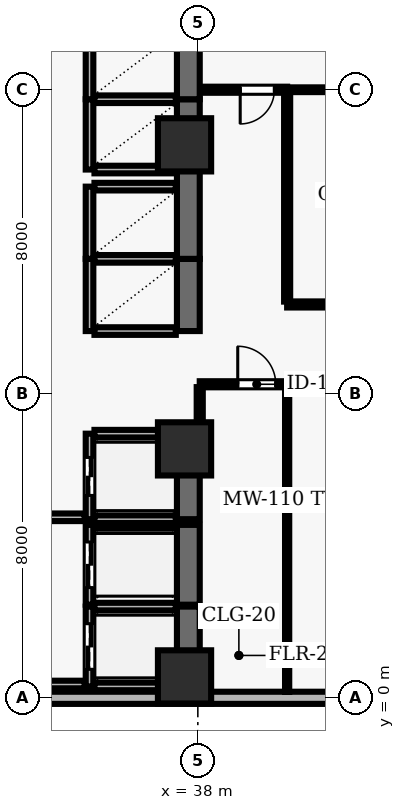
"""IFC4 building model, lengths in metres.
Left out: names, types, materials, properties, quantities, classifications, styles, units other than length and angle.
Written with IfcOpenShell. Run it as: python <this file> out.ifc"""

import sys

from ifc_helpers import new_model, si_unit, direction, frame, frame_2d, origin, origin_2d, place, context, subcontext, project, spatial, rectangle, extrude, element, fill, save


model = new_model("IFC4")
c1 = context("Model", 3, precision=1e-05, world=origin(), true_north=direction((0.0, 1.0)))
c2 = subcontext(c1, "Body", "Model", "MODEL_VIEW")
j1 = project(units=[si_unit("LENGTHUNIT", "METRE"), si_unit("PLANEANGLEUNIT", "RADIAN")], contexts=[c1])
p1 = place(None, origin())
s1 = spatial("IfcSite", under=j1, at=p1, CompositionType="ELEMENT")
p2 = place(p1, origin())
s2 = spatial("IfcBuilding", under=s1, at=p2, CompositionType="ELEMENT")
p3 = place(p2, frame((0.0, 0.0, 89.5)))
s3 = spatial("IfcBuildingStorey", under=s2, at=p3, CompositionType="ELEMENT", Elevation=89.5)
for number, where, z_axis, x_axis in (
    (1, (37.65, 0.55, 0.0), (0.0, 0.0, 1.0), (1.0, 0.0, 0.0)),
    (2, (37.65, 6.55, 0.0), (0.0, 0.0, 1.0), (1.0, 0.0, 0.0)),
    (3, (37.65, 14.55, 0.0), (0.0, 0.0, 1.0), (1.0, 0.0, 0.0)),
):
    element("IfcColumn", number, at=place(p3, frame(where, z_axis=z_axis, x_axis=x_axis)), inside=s3, PredefinedType="COLUMN", context=c2, shape_type="SweptSolid", body=[
        extrude(rectangle(XDim=1.4, YDim=1.4, at=origin_2d()), origin(), (0.0, 0.0, 1.0), 3.9),
    ])
p4 = place(p3, frame((24.5, 0.0, 0.0), z_axis=(0.0, 0.0, 1.0), x_axis=(1.0, 0.0, 0.0)))
e4 = element("IfcWall", 4, at=p4, inside=s3, PredefinedType="SOLIDWALL", context=c2, shape_type="SweptSolid", body=[
    extrude(rectangle(XDim=49.0, YDim=0.32, at=frame_2d((24.5, 0.0))), origin(), (0.0, 0.0, 1.0), 3.64),
])
p5 = place(p4, frame((1.822, 0.0, 0.9)))
e5 = element("IfcOpeningElement", 5, at=p5, cuts=e4, PredefinedType="OPENING", context=c2, shape_type="SweptSolid", body=[
    extrude(rectangle(XDim=1.8, YDim=2.2, at=frame_2d((0.9, 1.1))), frame((0.0, 0.17, 0.0), z_axis=(0.0, -1.0, 0.0), x_axis=(1.0, 0.0, 0.0)), (0.0, 0.0, 1.0), 0.34),
])
p6 = place(p4, frame((18.156, 0.0, 0.9)))
e6 = element("IfcOpeningElement", 6, at=p6, cuts=e4, PredefinedType="OPENING", context=c2, shape_type="SweptSolid", body=[
    extrude(rectangle(XDim=1.8, YDim=2.2, at=frame_2d((0.9, 1.1))), frame((0.0, 0.17, 0.0), z_axis=(0.0, -1.0, 0.0), x_axis=(1.0, 0.0, 0.0)), (0.0, 0.0, 1.0), 0.34),
])
p7 = place(p4, frame((22.7, 0.0, 0.9)))
e7 = element("IfcOpeningElement", 7, at=p7, cuts=e4, PredefinedType="OPENING", context=c2, shape_type="SweptSolid", body=[
    extrude(rectangle(XDim=1.8, YDim=2.2, at=frame_2d((0.9, 1.1))), frame((0.0, 0.17, 0.0), z_axis=(0.0, -1.0, 0.0), x_axis=(1.0, 0.0, 0.0)), (0.0, 0.0, 1.0), 0.34),
])
p8 = place(p4, frame((29.044, 0.0, 0.9)))
e8 = element("IfcOpeningElement", 8, at=p8, cuts=e4, PredefinedType="OPENING", context=c2, shape_type="SweptSolid", body=[
    extrude(rectangle(XDim=1.8, YDim=2.2, at=frame_2d((0.9, 1.1))), frame((0.0, 0.17, 0.0), z_axis=(0.0, -1.0, 0.0), x_axis=(1.0, 0.0, 0.0)), (0.0, 0.0, 1.0), 0.34),
])
p9 = place(p4, frame((35.389, 0.0, 0.9)))
e9 = element("IfcOpeningElement", 9, at=p9, cuts=e4, PredefinedType="OPENING", context=c2, shape_type="SweptSolid", body=[
    extrude(rectangle(XDim=1.8, YDim=2.2, at=frame_2d((0.9, 1.1))), frame((0.0, 0.17, 0.0), z_axis=(0.0, -1.0, 0.0), x_axis=(1.0, 0.0, 0.0)), (0.0, 0.0, 1.0), 0.34),
])
p10 = place(p4, frame((39.933, 0.0, 0.9)))
e10 = element("IfcOpeningElement", 10, at=p10, cuts=e4, PredefinedType="OPENING", context=c2, shape_type="SweptSolid", body=[
    extrude(rectangle(XDim=1.8, YDim=2.2, at=frame_2d((0.9, 1.1))), frame((0.0, 0.17, 0.0), z_axis=(0.0, -1.0, 0.0), x_axis=(1.0, 0.0, 0.0)), (0.0, 0.0, 1.0), 0.34),
])
p11 = place(p4, frame((45.378, 0.0, 0.9)))
e11 = element("IfcOpeningElement", 11, at=p11, cuts=e4, PredefinedType="OPENING", context=c2, shape_type="SweptSolid", body=[
    extrude(rectangle(XDim=1.8, YDim=2.2, at=frame_2d((0.9, 1.1))), frame((0.0, 0.17, 0.0), z_axis=(0.0, -1.0, 0.0), x_axis=(1.0, 0.0, 0.0)), (0.0, 0.0, 1.0), 0.34),
])
p12 = place(p3, frame((35.15, 2.4, 0.0), z_axis=(0.0, 0.0, 1.0), x_axis=(0.0, -1.0, 0.0)))
e12 = element("IfcWall", 12, at=p12, inside=s3, PredefinedType="SOLIDWALL", context=c2, shape_type="SweptSolid", body=[
    extrude(rectangle(XDim=2.1, YDim=0.2, at=frame_2d((1.05, 0.0))), origin(), (0.0, 0.0, 1.0), 3.64),
])
p13 = place(p12, frame((0.45, 0.0, 0.0)))
e13 = element("IfcOpeningElement", 13, at=p13, cuts=e12, PredefinedType="OPENING", context=c2, shape_type="SweptSolid", body=[
    extrude(rectangle(XDim=1.2, YDim=2.15, at=frame_2d((0.6, 1.075))), frame((0.0, 0.11, 0.0), z_axis=(0.0, -1.0, 0.0), x_axis=(1.0, 0.0, 0.0)), (0.0, 0.0, 1.0), 0.22),
])
p14 = place(p3, frame((37.75, 0.3, 0.0), z_axis=(0.0, 0.0, 1.0), x_axis=(0.0, 1.0, 0.0)))
e14 = element("IfcWall", 14, at=p14, inside=s3, PredefinedType="SHEAR", context=c2, shape_type="SweptSolid", body=[
    extrude(rectangle(XDim=2.1, YDim=0.6, at=frame_2d((1.05, 0.0))), origin(), (0.0, 0.0, 1.0), 3.64),
])
for number, where, z_axis, x_axis in (
    (15, (35.28, 0.3, 0.0), (0.0, 0.0, 1.0), (1.0, 0.0, 0.0)),
    (16, (37.42, 2.4, 0.0), (0.0, 0.0, 1.0), (-1.0, 0.0, 0.0)),
):
    element("IfcWall", number, at=place(p3, frame(where, z_axis=z_axis, x_axis=x_axis)), inside=s3, PredefinedType="SOLIDWALL", context=c2, shape_type="SweptSolid", body=[
        extrude(rectangle(XDim=2.14, YDim=0.2, at=frame_2d((1.07, 0.0))), origin(), (0.0, 0.0, 1.0), 3.64),
    ])
p15 = place(p3, frame((35.15, 4.55, 0.0), z_axis=(0.0, 0.0, 1.0), x_axis=(0.0, -1.0, 0.0)))
e17 = element("IfcWall", 17, at=p15, inside=s3, PredefinedType="SOLIDWALL", context=c2, shape_type="SweptSolid", body=[
    extrude(rectangle(XDim=2.1, YDim=0.2, at=frame_2d((1.05, 0.0))), origin(), (0.0, 0.0, 1.0), 3.64),
])
p16 = place(p15, frame((0.45, 0.0, 0.0)))
e18 = element("IfcOpeningElement", 18, at=p16, cuts=e17, PredefinedType="OPENING", context=c2, shape_type="SweptSolid", body=[
    extrude(rectangle(XDim=1.2, YDim=2.15, at=frame_2d((0.6, 1.075))), frame((0.0, 0.11, 0.0), z_axis=(0.0, -1.0, 0.0), x_axis=(1.0, 0.0, 0.0)), (0.0, 0.0, 1.0), 0.22),
])
p17 = place(p3, frame((37.75, 2.45, 0.0), z_axis=(0.0, 0.0, 1.0), x_axis=(0.0, 1.0, 0.0)))
e19 = element("IfcWall", 19, at=p17, inside=s3, PredefinedType="SHEAR", context=c2, shape_type="SweptSolid", body=[
    extrude(rectangle(XDim=2.1, YDim=0.6, at=frame_2d((1.05, 0.0))), origin(), (0.0, 0.0, 1.0), 3.64),
])
p18 = place(p3, frame((37.42, 4.55, 0.0), z_axis=(0.0, 0.0, 1.0), x_axis=(-1.0, 0.0, 0.0)))
e20 = element("IfcWall", 20, at=p18, inside=s3, PredefinedType="SOLIDWALL", context=c2, shape_type="SweptSolid", body=[
    extrude(rectangle(XDim=2.14, YDim=0.2, at=frame_2d((1.07, 0.0))), origin(), (0.0, 0.0, 1.0), 3.64),
])
p19 = place(p3, frame((35.15, 6.95, 0.0), z_axis=(0.0, 0.0, 1.0), x_axis=(0.0, -1.0, 0.0)))
e21 = element("IfcWall", 21, at=p19, inside=s3, PredefinedType="SOLIDWALL", context=c2, shape_type="SweptSolid", body=[
    extrude(rectangle(XDim=2.25, YDim=0.2, at=frame_2d((1.125, 0.0))), origin(), (0.0, 0.0, 1.0), 3.64),
])
p20 = place(p19, frame((0.625, 0.0, 0.0)))
e22 = element("IfcOpeningElement", 22, at=p20, cuts=e21, PredefinedType="OPENING", context=c2, shape_type="SweptSolid", body=[
    extrude(rectangle(XDim=1.0, YDim=2.1, at=frame_2d((0.5, 1.05))), frame((0.0, 0.11, 0.0), z_axis=(0.0, -1.0, 0.0), x_axis=(1.0, 0.0, 0.0)), (0.0, 0.0, 1.0), 0.22),
])
p21 = place(p3, frame((37.75, 4.7, 0.0), z_axis=(0.0, 0.0, 1.0), x_axis=(0.0, 1.0, 0.0)))
e23 = element("IfcWall", 23, at=p21, inside=s3, PredefinedType="SHEAR", context=c2, shape_type="SweptSolid", body=[
    extrude(rectangle(XDim=2.25, YDim=0.6, at=frame_2d((1.125, 0.0))), origin(), (0.0, 0.0, 1.0), 3.64),
])
for number, where, z_axis, x_axis in (
    (24, (35.28, 4.7, 0.0), (0.0, 0.0, 1.0), (1.0, 0.0, 0.0)),
    (25, (37.42, 6.95, 0.0), (0.0, 0.0, 1.0), (-1.0, 0.0, 0.0)),
):
    element("IfcWall", number, at=place(p3, frame(where, z_axis=z_axis, x_axis=x_axis)), inside=s3, PredefinedType="SOLIDWALL", context=c2, shape_type="SweptSolid", body=[
        extrude(rectangle(XDim=2.14, YDim=0.2, at=frame_2d((1.07, 0.0))), origin(), (0.0, 0.0, 1.0), 3.64),
    ])
p22 = place(p3, frame((35.15, 11.55, 0.0), z_axis=(0.0, 0.0, 1.0), x_axis=(0.0, -1.0, 0.0)))
e26 = element("IfcWall", 26, at=p22, inside=s3, PredefinedType="SOLIDWALL", context=c2, shape_type="SweptSolid", body=[
    extrude(rectangle(XDim=1.9, YDim=0.2, at=frame_2d((0.95, 0.0))), origin(), (0.0, 0.0, 1.0), 3.64),
])
p23 = place(p3, frame((37.75, 9.65, 0.0), z_axis=(0.0, 0.0, 1.0), x_axis=(0.0, 1.0, 0.0)))
e27 = element("IfcWall", 27, at=p23, inside=s3, PredefinedType="SHEAR", context=c2, shape_type="SweptSolid", body=[
    extrude(rectangle(XDim=1.9, YDim=0.6, at=frame_2d((0.95, 0.0))), origin(), (0.0, 0.0, 1.0), 3.64),
])
for number, where, z_axis, x_axis in (
    (28, (35.28, 9.65, 0.0), (0.0, 0.0, 1.0), (1.0, 0.0, 0.0)),
    (29, (37.42, 11.55, 0.0), (0.0, 0.0, 1.0), (-1.0, 0.0, 0.0)),
):
    element("IfcWall", number, at=place(p3, frame(where, z_axis=z_axis, x_axis=x_axis)), inside=s3, PredefinedType="SOLIDWALL", context=c2, shape_type="SweptSolid", body=[
        extrude(rectangle(XDim=2.14, YDim=0.2, at=frame_2d((1.07, 0.0))), origin(), (0.0, 0.0, 1.0), 3.64),
    ])
p24 = place(p3, frame((35.15, 13.45, 0.0), z_axis=(0.0, 0.0, 1.0), x_axis=(0.0, -1.0, 0.0)))
e30 = element("IfcWall", 30, at=p24, inside=s3, PredefinedType="SOLIDWALL", context=c2, shape_type="SweptSolid", body=[
    extrude(rectangle(XDim=1.9, YDim=0.2, at=frame_2d((0.95, 0.0))), origin(), (0.0, 0.0, 1.0), 3.64),
])
p25 = place(p3, frame((37.75, 11.55, 0.0), z_axis=(0.0, 0.0, 1.0), x_axis=(0.0, 1.0, 0.0)))
e31 = element("IfcWall", 31, at=p25, inside=s3, PredefinedType="SHEAR", context=c2, shape_type="SweptSolid", body=[
    extrude(rectangle(XDim=2.35, YDim=0.6, at=frame_2d((1.175, 0.0))), origin(), (0.0, 0.0, 1.0), 3.64),
])
p26 = place(p3, frame((37.42, 13.45, 0.0), z_axis=(0.0, 0.0, 1.0), x_axis=(-1.0, 0.0, 0.0)))
e32 = element("IfcWall", 32, at=p26, inside=s3, PredefinedType="SOLIDWALL", context=c2, shape_type="SweptSolid", body=[
    extrude(rectangle(XDim=2.14, YDim=0.2, at=frame_2d((1.07, 0.0))), origin(), (0.0, 0.0, 1.0), 3.64),
])
p27 = place(p3, frame((35.15, 15.75, 0.0), z_axis=(0.0, 0.0, 1.0), x_axis=(0.0, -1.0, 0.0)))
e33 = element("IfcWall", 33, at=p27, inside=s3, PredefinedType="SOLIDWALL", context=c2, shape_type="SweptSolid", body=[
    extrude(rectangle(XDim=1.85, YDim=0.2, at=frame_2d((0.925, 0.0))), origin(), (0.0, 0.0, 1.0), 3.64),
])
p28 = place(p3, frame((37.75, 13.9, 0.0), z_axis=(0.0, 0.0, 1.0), x_axis=(0.0, 1.0, 0.0)))
e34 = element("IfcWall", 34, at=p28, inside=s3, PredefinedType="SHEAR", context=c2, shape_type="SweptSolid", body=[
    extrude(rectangle(XDim=1.85, YDim=0.6, at=frame_2d((0.925, 0.0))), origin(), (0.0, 0.0, 1.0), 3.64),
])
for number, where, z_axis, x_axis in (
    (35, (35.28, 13.9, 0.0), (0.0, 0.0, 1.0), (1.0, 0.0, 0.0)),
    (36, (37.42, 15.75, 0.0), (0.0, 0.0, 1.0), (-1.0, 0.0, 0.0)),
):
    element("IfcWall", number, at=place(p3, frame(where, z_axis=z_axis, x_axis=x_axis)), inside=s3, PredefinedType="SOLIDWALL", context=c2, shape_type="SweptSolid", body=[
        extrude(rectangle(XDim=2.14, YDim=0.2, at=frame_2d((1.07, 0.0))), origin(), (0.0, 0.0, 1.0), 3.64),
    ])
p29 = place(p3, frame((35.15, 17.6, 0.0), z_axis=(0.0, 0.0, 1.0), x_axis=(0.0, -1.0, 0.0)))
e37 = element("IfcWall", 37, at=p29, inside=s3, PredefinedType="SOLIDWALL", context=c2, shape_type="SweptSolid", body=[
    extrude(rectangle(XDim=1.85, YDim=0.2, at=frame_2d((0.925, 0.0))), origin(), (0.0, 0.0, 1.0), 3.64),
])
p30 = place(p3, frame((37.75, 15.75, 0.0), z_axis=(0.0, 0.0, 1.0), x_axis=(0.0, 1.0, 0.0)))
e38 = element("IfcWall", 38, at=p30, inside=s3, PredefinedType="SHEAR", context=c2, shape_type="SweptSolid", body=[
    extrude(rectangle(XDim=1.85, YDim=0.6, at=frame_2d((0.925, 0.0))), origin(), (0.0, 0.0, 1.0), 3.64),
])
p31 = place(p3, frame((31.65, 0.35, 0.0), z_axis=(0.0, 0.0, 1.0), x_axis=(1.0, 0.0, 0.0)))
e39 = element("IfcWall", 39, at=p31, inside=s3, PredefinedType="SOLIDWALL", context=c2, shape_type="SweptSolid", body=[
    extrude(rectangle(XDim=3.37, YDim=0.2, at=frame_2d((1.685, 0.0))), origin(), (0.0, 0.0, 1.0), 3.64),
])
p32 = place(p3, frame((35.02, 4.75, 0.0), z_axis=(0.0, 0.0, 1.0), x_axis=(-1.0, 0.0, 0.0)))
e40 = element("IfcWall", 40, at=p32, inside=s3, PredefinedType="SOLIDWALL", context=c2, shape_type="SweptSolid", body=[
    extrude(rectangle(XDim=3.11, YDim=0.2, at=frame_2d((1.555, 0.0))), origin(), (0.0, 0.0, 1.0), 3.64),
])
p33 = place(p32, frame((1.03, 0.0, 0.0)))
e41 = element("IfcOpeningElement", 41, at=p33, cuts=e40, PredefinedType="OPENING", context=c2, shape_type="SweptSolid", body=[
    extrude(rectangle(XDim=1.05, YDim=2.15, at=frame_2d((0.525, 1.075))), frame((0.0, 0.11, 0.0), z_axis=(0.0, -1.0, 0.0), x_axis=(1.0, 0.0, 0.0)), (0.0, 0.0, 1.0), 0.22),
])
p34 = place(p3, frame((38.05, 8.25, 0.0), z_axis=(0.0, 0.0, 1.0), x_axis=(1.0, 0.0, 0.0)))
e42 = element("IfcWall", 42, at=p34, inside=s3, PredefinedType="PARTITIONING", context=c2, shape_type="SweptSolid", body=[
    extrude(rectangle(XDim=2.3, YDim=0.16, at=frame_2d((1.15, 0.0))), origin(), (0.0, 0.0, 1.0), 3.005),
])
p35 = place(p34, frame((1.0, 0.0, 0.0)))
e43 = element("IfcOpeningElement", 43, at=p35, cuts=e42, PredefinedType="OPENING", context=c2, shape_type="SweptSolid", body=[
    extrude(rectangle(XDim=1.0, YDim=2.1, at=frame_2d((0.5, 1.05))), frame((0.0, 0.09, 0.0), z_axis=(0.0, -1.0, 0.0), x_axis=(1.0, 0.0, 0.0)), (0.0, 0.0, 1.0), 0.18),
])
p36 = place(p3, frame((40.35, 8.25, 0.0), z_axis=(0.0, 0.0, 1.0), x_axis=(1.0, 0.0, 0.0)))
e44 = element("IfcWall", 44, at=p36, inside=s3, PredefinedType="PARTITIONING", context=c2, shape_type="SweptSolid", body=[
    extrude(rectangle(XDim=9.27, YDim=0.16, at=frame_2d((4.635, 0.0))), origin(), (0.0, 0.0, 1.0), 3.005),
])
p37 = place(p36, frame((3.135, 0.0, 0.0)))
e45 = element("IfcOpeningElement", 45, at=p37, cuts=e44, PredefinedType="OPENING", context=c2, shape_type="SweptSolid", body=[
    extrude(rectangle(XDim=0.9, YDim=2.1, at=frame_2d((0.45, 1.05))), frame((0.0, 0.09, 0.0), z_axis=(0.0, -1.0, 0.0), x_axis=(1.0, 0.0, 0.0)), (0.0, 0.0, 1.0), 0.18),
])
p38 = place(p3, frame((40.35, 16.0, 0.0), z_axis=(0.0, 0.0, 1.0), x_axis=(1.0, 0.0, 0.0)))
e46 = element("IfcWall", 46, at=p38, inside=s3, PredefinedType="PARTITIONING", context=c2, shape_type="SweptSolid", body=[
    extrude(rectangle(XDim=6.295, YDim=0.125, at=frame_2d((3.147, 0.0))), origin(), (0.0, 0.0, 1.0), 3.64),
])
p39 = place(p3, frame((40.35, 16.0, 0.0), z_axis=(0.0, 0.0, 1.0), x_axis=(-1.0, 0.0, 0.0)))
e47 = element("IfcWall", 47, at=p39, inside=s3, PredefinedType="PARTITIONING", context=c2, shape_type="SweptSolid", body=[
    extrude(rectangle(XDim=2.27, YDim=0.16, at=frame_2d((1.135, 0.0))), origin(), (0.0, 0.0, 1.0), 3.64),
])
p40 = place(p39, frame((0.335, 0.0, 0.0)))
e48 = element("IfcOpeningElement", 48, at=p40, cuts=e47, PredefinedType="OPENING", context=c2, shape_type="SweptSolid", body=[
    extrude(rectangle(XDim=0.9, YDim=2.1, at=frame_2d((0.45, 1.05))), frame((0.0, 0.09, 0.0), z_axis=(0.0, -1.0, 0.0), x_axis=(1.0, 0.0, 0.0)), (0.0, 0.0, 1.0), 0.18),
])
p41 = place(p3, frame((49.62, 10.35, 0.0), z_axis=(0.0, 0.0, 1.0), x_axis=(-1.0, 0.0, 0.0)))
e49 = element("IfcWall", 49, at=p41, inside=s3, PredefinedType="PARTITIONING", context=c2, shape_type="SweptSolid", body=[
    extrude(rectangle(XDim=9.27, YDim=0.16, at=frame_2d((4.635, 0.0))), origin(), (0.0, 0.0, 1.0), 3.227),
])
p42 = place(p41, frame((4.135, 0.0, 0.0)))
e50 = element("IfcOpeningElement", 50, at=p42, cuts=e49, PredefinedType="OPENING", context=c2, shape_type="SweptSolid", body=[
    extrude(rectangle(XDim=1.0, YDim=2.1, at=frame_2d((0.5, 1.05))), frame((0.0, 0.09, 0.0), z_axis=(0.0, -1.0, 0.0), x_axis=(1.0, 0.0, 0.0)), (0.0, 0.0, 1.0), 0.18),
])
p43 = place(p3, frame((38.05, 7.05, 0.0), z_axis=(0.0, 0.0, 1.0), x_axis=(0.0, 1.0, 0.0)))
e51 = element("IfcWall", 51, at=p43, inside=s3, PredefinedType="PARTITIONING", context=c2, shape_type="SweptSolid", body=[
    extrude(rectangle(XDim=1.125, YDim=0.16, at=frame_2d((0.562, 0.0))), origin(), (0.0, 0.0, 1.0), 3.005),
])
p44 = place(p3, frame((40.35, 0.155, 0.0), z_axis=(0.0, 0.0, 1.0), x_axis=(0.0, 1.0, 0.0)))
e52 = element("IfcWall", 52, at=p44, inside=s3, PredefinedType="MOVABLE", context=c2, shape_type="SweptSolid", body=[
    extrude(rectangle(XDim=8.02, YDim=0.11, at=frame_2d((4.01, 0.0))), origin(), (0.0, 0.0, 1.0), 3.64),
])
p45 = place(p3, frame((40.35, 10.425, 0.0), z_axis=(0.0, 0.0, 1.0), x_axis=(0.0, 1.0, 0.0)))
e53 = element("IfcWall", 53, at=p45, inside=s3, PredefinedType="PARTITIONING", context=c2, shape_type="SweptSolid", body=[
    extrude(rectangle(XDim=5.5, YDim=0.16, at=frame_2d((2.75, 0.0))), origin(), (0.0, 0.0, 1.0), 3.227),
])
p46 = place(p13, origin())
e54 = element("IfcDoor", 54, at=p46, inside=s3, OperationType="DOUBLE_DOOR_SLIDING", PredefinedType="DOOR", context=c2, shape_type="SweptSolid", body=[
    extrude(rectangle(XDim=1.2, YDim=2.15, at=frame_2d((0.6, 1.075))), frame((0.0, 0.025, 0.0), z_axis=(0.0, -1.0, 0.0), x_axis=(1.0, 0.0, 0.0)), (0.0, 0.0, 1.0), 0.05),
])
fill(e13, e54)
p47 = place(p16, origin())
e55 = element("IfcDoor", 55, at=p47, inside=s3, OperationType="DOUBLE_DOOR_SLIDING", PredefinedType="DOOR", context=c2, shape_type="SweptSolid", body=[
    extrude(rectangle(XDim=1.2, YDim=2.15, at=frame_2d((0.6, 1.075))), frame((0.0, 0.025, 0.0), z_axis=(0.0, -1.0, 0.0), x_axis=(1.0, 0.0, 0.0)), (0.0, 0.0, 1.0), 0.05),
])
fill(e18, e55)
p48 = place(p20, origin())
e56 = element("IfcDoor", 56, at=p48, inside=s3, OperationType="DOUBLE_DOOR_SLIDING", PredefinedType="DOOR", context=c2, shape_type="SweptSolid", body=[
    extrude(rectangle(XDim=1.0, YDim=2.1, at=frame_2d((0.5, 1.05))), frame((0.0, 0.025, 0.0), z_axis=(0.0, -1.0, 0.0), x_axis=(1.0, 0.0, 0.0)), (0.0, 0.0, 1.0), 0.05),
])
fill(e22, e56)
p49 = place(p35, origin())
e57 = element("IfcDoor", 57, at=p49, inside=s3, OperationType="SINGLE_SWING_LEFT", PredefinedType="DOOR", context=c2, shape_type="SweptSolid", body=[
    extrude(rectangle(XDim=1.0, YDim=2.1, at=frame_2d((0.5, 1.05))), frame((0.0, 0.025, 0.0), z_axis=(0.0, -1.0, 0.0), x_axis=(1.0, 0.0, 0.0)), (0.0, 0.0, 1.0), 0.05),
])
fill(e43, e57)
p50 = place(p40, origin())
e58 = element("IfcDoor", 58, at=p50, inside=s3, OperationType="SINGLE_SWING_RIGHT", PredefinedType="DOOR", context=c2, shape_type="SweptSolid", body=[
    extrude(rectangle(XDim=0.9, YDim=2.1, at=frame_2d((0.45, 1.05))), frame((0.0, 0.025, 0.0), z_axis=(0.0, -1.0, 0.0), x_axis=(1.0, 0.0, 0.0)), (0.0, 0.0, 1.0), 0.05),
])
fill(e48, e58)
save(model, sys.argv[1])
